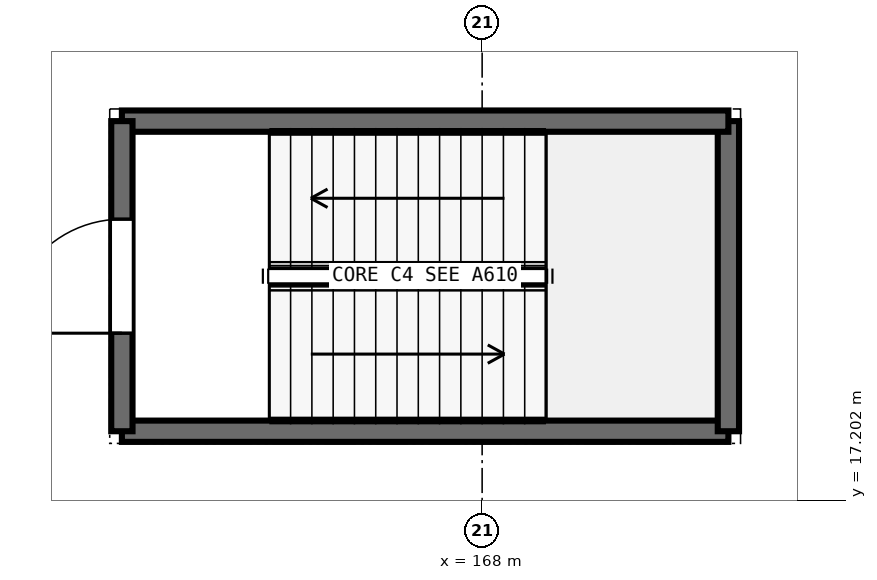
"""IFC4 building model, lengths in metres.
Left out: names, types, materials, properties, quantities, classifications, styles, units other than length and angle.
Written with IfcOpenShell. Run it as: python <this file> out.ifc"""

import sys

from ifc_helpers import new_model, si_unit, direction, frame, frame_2d, origin, place, context, subcontext, project, spatial, rectangle, extrude, element, fill, save


model = new_model("IFC4")
c1 = context("Model", 3, precision=1e-05, world=origin(), true_north=direction((0.0, 1.0)))
c2 = subcontext(c1, "Body", "Model", "MODEL_VIEW")
j1 = project(units=[si_unit("LENGTHUNIT", "METRE"), si_unit("PLANEANGLEUNIT", "RADIAN")], contexts=[c1])
p1 = place(None, origin())
s1 = spatial("IfcSite", under=j1, at=p1, CompositionType="ELEMENT")
p2 = place(p1, origin())
s2 = spatial("IfcBuilding", under=s1, at=p2, CompositionType="ELEMENT")
p3 = place(p2, frame((0.0, 0.0, -4.8)))
s3 = spatial("IfcBuildingStorey", under=s2, at=p3, CompositionType="ELEMENT", Elevation=-4.8)
p4 = place(p3, frame((163.26, 18.11, 0.0), z_axis=(0.0, 0.0, 1.0), x_axis=(1.0, 0.0, 0.0)))
e1 = element("IfcWall", 1, at=p4, inside=s3, PredefinedType="SHEAR", context=c2, shape_type="SweptSolid", body=[
    extrude(rectangle(XDim=7.98, YDim=0.28, at=frame_2d((3.99, 0.0))), origin(), (0.0, 0.0, 1.0), 4.8),
])
p5 = place(p3, frame((171.24, 18.11, 0.0), z_axis=(0.0, 0.0, 1.0), x_axis=(0.0, 1.0, 0.0)))
e2 = element("IfcWall", 2, at=p5, inside=s3, PredefinedType="SHEAR", context=c2, shape_type="SweptSolid", body=[
    extrude(rectangle(XDim=4.08, YDim=0.28, at=frame_2d((2.04, 0.0))), origin(), (0.0, 0.0, 1.0), 4.8),
])
p6 = place(p3, frame((171.24, 22.19, 0.0), z_axis=(0.0, 0.0, 1.0), x_axis=(-1.0, 0.0, 0.0)))
e3 = element("IfcWall", 3, at=p6, inside=s3, PredefinedType="SHEAR", context=c2, shape_type="SweptSolid", body=[
    extrude(rectangle(XDim=7.98, YDim=0.28, at=frame_2d((3.99, 0.0))), origin(), (0.0, 0.0, 1.0), 4.8),
])
p7 = place(p3, frame((163.26, 22.19, 0.0), z_axis=(0.0, 0.0, 1.0), x_axis=(0.0, -1.0, 0.0)))
e4 = element("IfcWall", 4, at=p7, inside=s3, PredefinedType="SHEAR", context=c2, shape_type="SweptSolid", body=[
    extrude(rectangle(XDim=4.08, YDim=0.28, at=frame_2d((2.04, 0.0))), origin(), (0.0, 0.0, 1.0), 4.8),
])
p8 = place(p7, frame((1.29, 0.0, 0.0)))
e5 = element("IfcOpeningElement", 5, at=p8, cuts=e4, PredefinedType="OPENING", context=c2, shape_type="SweptSolid", body=[
    extrude(rectangle(XDim=1.5, YDim=2.2, at=frame_2d((0.75, 1.1))), frame((0.0, 0.15, 0.0), z_axis=(0.0, -1.0, 0.0), x_axis=(1.0, 0.0, 0.0)), (0.0, 0.0, 1.0), 0.3),
])
p9 = place(p8, frame((1.5, 0.0, 0.0), z_axis=(0.0, 0.0, 1.0), x_axis=(-1.0, 0.0, 0.0)))
e6 = element("IfcDoor", 6, at=p9, inside=s3, OperationType="SINGLE_SWING_LEFT", PredefinedType="DOOR", context=c2, shape_type="SweptSolid", body=[
    extrude(rectangle(XDim=1.5, YDim=2.2, at=frame_2d((0.75, 1.1))), frame((0.0, 0.025, 0.0), z_axis=(0.0, -1.0, 0.0), x_axis=(1.0, 0.0, 0.0)), (0.0, 0.0, 1.0), 0.05),
])
fill(e5, e6)
save(model, sys.argv[1])
